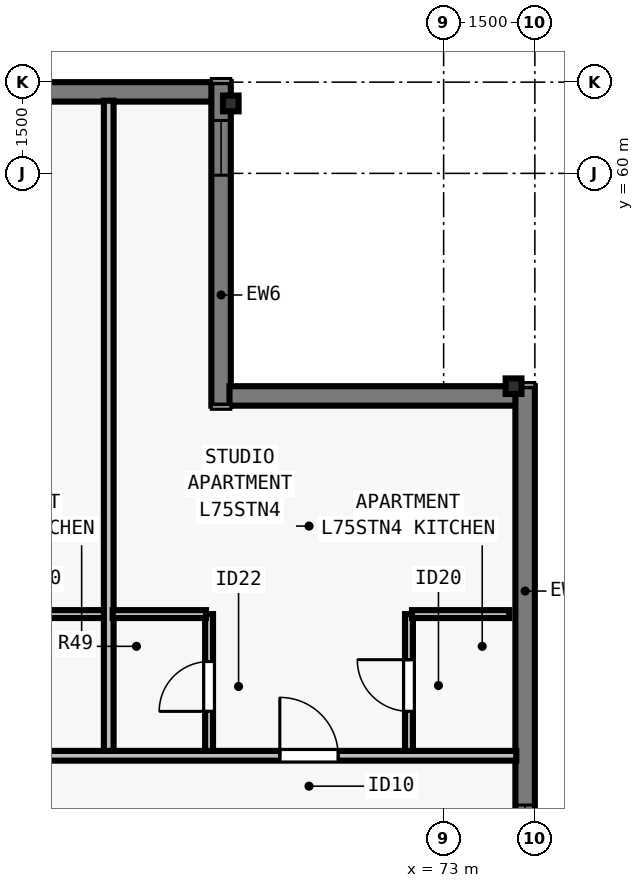
"""IFC4 building model, lengths in metres.
Left out: names, types, materials, properties, quantities, classifications, styles, units other than length and angle.
Written with IfcOpenShell. Run it as: python <this file> out.ifc"""

import sys

from ifc_helpers import new_model, si_unit, direction, frame, frame_2d, origin, origin_2d, place, context, subcontext, project, spatial, rectangle, i_section, extrude, element, fill, save


model = new_model("IFC4")
c1 = context("Model", 3, precision=1e-05, world=origin(), true_north=direction((0.0, 1.0)))
c2 = subcontext(c1, "Body", "Model", "MODEL_VIEW")
j1 = project(units=[si_unit("LENGTHUNIT", "METRE"), si_unit("PLANEANGLEUNIT", "RADIAN")], contexts=[c1])
p1 = place(None, origin())
s1 = spatial("IfcSite", under=j1, at=p1, CompositionType="ELEMENT")
p2 = place(p1, origin())
s2 = spatial("IfcBuilding", under=s1, at=p2, CompositionType="ELEMENT")
p3 = place(p2, frame((0.0, 0.0, 272.5)))
s3 = spatial("IfcBuildingStorey", under=s2, at=p3, CompositionType="ELEMENT", Elevation=272.5)
for number, where, z_axis, x_axis in (
    (1, (74.15, 56.5, 0.0), (0.0, 0.0, 1.0), (0.0, 1.0, 0.0)),
    (2, (69.5, 61.15, 0.0), (0.0, 0.0, 1.0), (1.0, 0.0, 0.0)),
):
    element("IfcColumn", number, at=place(p3, frame(where, z_axis=z_axis, x_axis=x_axis)), inside=s3, PredefinedType="COLUMN", context=c2, shape_type="SweptSolid", body=[
        extrude(i_section(OverallWidth=0.256, OverallDepth=0.26, WebThickness=0.01, FlangeThickness=0.017, FilletRadius=0.013, at=origin_2d()), origin(), (0.0, 0.0, 1.0), 3.5),
    ])
p4 = place(p3, frame((34.5, 61.34, 0.0), z_axis=(0.0, 0.0, 1.0), x_axis=(1.0, 0.0, 0.0)))
e3 = element("IfcWall", 3, at=p4, inside=s3, PredefinedType="SOLIDWALL", context=c2, shape_type="SweptSolid", body=[
    extrude(rectangle(XDim=34.702, YDim=0.32, at=frame_2d((17.351, 0.0))), origin(), (0.0, 0.0, 1.0), 3.24),
])
p5 = place(p4, frame((4.613, 0.0, 0.8)))
e4 = element("IfcOpeningElement", 4, at=p5, cuts=e3, PredefinedType="OPENING", context=c2, shape_type="SweptSolid", body=[
    extrude(rectangle(XDim=1.85, YDim=1.628, at=frame_2d((0.925, 0.814))), frame((0.0, 0.17, 0.0), z_axis=(0.0, -1.0, 0.0), x_axis=(1.0, 0.0, 0.0)), (0.0, 0.0, 1.0), 0.34),
])
p6 = place(p4, frame((8.138, 0.0, 0.8)))
e5 = element("IfcOpeningElement", 5, at=p6, cuts=e3, PredefinedType="OPENING", context=c2, shape_type="SweptSolid", body=[
    extrude(rectangle(XDim=1.55, YDim=1.628, at=frame_2d((0.775, 0.814))), frame((0.0, 0.17, 0.0), z_axis=(0.0, -1.0, 0.0), x_axis=(1.0, 0.0, 0.0)), (0.0, 0.0, 1.0), 0.34),
])
p7 = place(p4, frame((14.888, 0.0, 0.8)))
e6 = element("IfcOpeningElement", 6, at=p7, cuts=e3, PredefinedType="OPENING", context=c2, shape_type="SweptSolid", body=[
    extrude(rectangle(XDim=1.55, YDim=1.628, at=frame_2d((0.775, 0.814))), frame((0.0, 0.17, 0.0), z_axis=(0.0, -1.0, 0.0), x_axis=(1.0, 0.0, 0.0)), (0.0, 0.0, 1.0), 0.34),
])
p8 = place(p4, frame((19.364, 0.0, 0.8)))
e7 = element("IfcOpeningElement", 7, at=p8, cuts=e3, PredefinedType="OPENING", context=c2, shape_type="SweptSolid", body=[
    extrude(rectangle(XDim=1.85, YDim=1.628, at=frame_2d((0.925, 0.814))), frame((0.0, 0.17, 0.0), z_axis=(0.0, -1.0, 0.0), x_axis=(1.0, 0.0, 0.0)), (0.0, 0.0, 1.0), 0.34),
])
p9 = place(p4, frame((25.314, 0.0, 0.8)))
e8 = element("IfcOpeningElement", 8, at=p9, cuts=e3, PredefinedType="OPENING", context=c2, shape_type="SweptSolid", body=[
    extrude(rectangle(XDim=1.85, YDim=1.628, at=frame_2d((0.925, 0.814))), frame((0.0, 0.17, 0.0), z_axis=(0.0, -1.0, 0.0), x_axis=(1.0, 0.0, 0.0)), (0.0, 0.0, 1.0), 0.34),
])
p10 = place(p4, frame((28.389, 0.0, 0.8)))
e9 = element("IfcOpeningElement", 9, at=p10, cuts=e3, PredefinedType="OPENING", context=c2, shape_type="SweptSolid", body=[
    extrude(rectangle(XDim=1.55, YDim=1.628, at=frame_2d((0.775, 0.814))), frame((0.0, 0.17, 0.0), z_axis=(0.0, -1.0, 0.0), x_axis=(1.0, 0.0, 0.0)), (0.0, 0.0, 1.0), 0.34),
])
p11 = place(p3, frame((69.34, 61.5, 0.0), z_axis=(0.0, 0.0, 1.0), x_axis=(0.0, -1.0, 0.0)))
e10 = element("IfcWall", 10, at=p11, inside=s3, PredefinedType="SOLIDWALL", context=c2, shape_type="SweptSolid", body=[
    extrude(rectangle(XDim=5.32, YDim=0.32, at=frame_2d((2.66, 0.0))), origin(), (0.0, 0.0, 1.0), 3.24),
])
p12 = place(p11, frame((0.63, 0.0, 0.8)))
e11 = element("IfcOpeningElement", 11, at=p12, cuts=e10, PredefinedType="OPENING", context=c2, shape_type="SweptSolid", body=[
    extrude(rectangle(XDim=0.9, YDim=1.628, at=frame_2d((0.45, 0.814))), frame((0.0, 0.17, 0.0), z_axis=(0.0, -1.0, 0.0), x_axis=(1.0, 0.0, 0.0)), (0.0, 0.0, 1.0), 0.34),
])
p13 = place(p3, frame((69.478, 56.34, 0.0), z_axis=(0.0, 0.0, 1.0), x_axis=(1.0, 0.0, 0.0)))
e12 = element("IfcWall", 12, at=p13, inside=s3, PredefinedType="SOLIDWALL", context=c2, shape_type="SweptSolid", body=[
    extrude(rectangle(XDim=4.724, YDim=0.32, at=frame_2d((2.362, 0.0))), origin(), (0.0, 0.0, 1.0), 3.24),
])
p14 = place(p3, frame((74.34, 56.5, 0.0), z_axis=(0.0, 0.0, 1.0), x_axis=(0.0, -1.0, 0.0)))
e13 = element("IfcWall", 13, at=p14, inside=s3, PredefinedType="SOLIDWALL", context=c2, shape_type="SweptSolid", body=[
    extrude(rectangle(XDim=34.702, YDim=0.32, at=frame_2d((17.351, 0.0))), origin(), (0.0, 0.0, 1.0), 3.24),
])
p15 = place(p14, frame((6.888, 0.0, 0.8)))
e14 = element("IfcOpeningElement", 14, at=p15, cuts=e13, PredefinedType="OPENING", context=c2, shape_type="SweptSolid", body=[
    extrude(rectangle(XDim=1.55, YDim=1.628, at=frame_2d((0.775, 0.814))), frame((0.0, 0.17, 0.0), z_axis=(0.0, -1.0, 0.0), x_axis=(1.0, 0.0, 0.0)), (0.0, 0.0, 1.0), 0.34),
])
p16 = place(p14, frame((10.113, 0.0, 0.8)))
e15 = element("IfcOpeningElement", 15, at=p16, cuts=e13, PredefinedType="OPENING", context=c2, shape_type="SweptSolid", body=[
    extrude(rectangle(XDim=1.85, YDim=1.628, at=frame_2d((0.925, 0.814))), frame((0.0, 0.17, 0.0), z_axis=(0.0, -1.0, 0.0), x_axis=(1.0, 0.0, 0.0)), (0.0, 0.0, 1.0), 0.34),
])
p17 = place(p14, frame((14.038, 0.0, 0.8)))
e16 = element("IfcOpeningElement", 16, at=p17, cuts=e13, PredefinedType="OPENING", context=c2, shape_type="SweptSolid", body=[
    extrude(rectangle(XDim=1.55, YDim=1.628, at=frame_2d((0.775, 0.814))), frame((0.0, 0.17, 0.0), z_axis=(0.0, -1.0, 0.0), x_axis=(1.0, 0.0, 0.0)), (0.0, 0.0, 1.0), 0.34),
])
p18 = place(p14, frame((18.114, 0.0, 0.8)))
e17 = element("IfcOpeningElement", 17, at=p18, cuts=e13, PredefinedType="OPENING", context=c2, shape_type="SweptSolid", body=[
    extrude(rectangle(XDim=1.85, YDim=1.628, at=frame_2d((0.925, 0.814))), frame((0.0, 0.17, 0.0), z_axis=(0.0, -1.0, 0.0), x_axis=(1.0, 0.0, 0.0)), (0.0, 0.0, 1.0), 0.34),
])
p19 = place(p14, frame((23.614, 0.0, 0.8)))
e18 = element("IfcOpeningElement", 18, at=p19, cuts=e13, PredefinedType="OPENING", context=c2, shape_type="SweptSolid", body=[
    extrude(rectangle(XDim=1.85, YDim=1.628, at=frame_2d((0.925, 0.814))), frame((0.0, 0.17, 0.0), z_axis=(0.0, -1.0, 0.0), x_axis=(1.0, 0.0, 0.0)), (0.0, 0.0, 1.0), 0.34),
])
p20 = place(p14, frame((29.24, 0.0, 0.8)))
e19 = element("IfcOpeningElement", 19, at=p20, cuts=e13, PredefinedType="OPENING", context=c2, shape_type="SweptSolid", body=[
    extrude(rectangle(XDim=1.55, YDim=1.628, at=frame_2d((0.775, 0.814))), frame((0.0, 0.17, 0.0), z_axis=(0.0, -1.0, 0.0), x_axis=(1.0, 0.0, 0.0)), (0.0, 0.0, 1.0), 0.34),
])
p21 = place(p3, frame((29.805, 50.423, 0.0), z_axis=(0.0, 0.0, 1.0), x_axis=(1.0, 0.0, 0.0)))
e20 = element("IfcWall", 20, at=p21, inside=s3, PredefinedType="PARTITIONING", context=c2, shape_type="SweptSolid", body=[
    extrude(rectangle(XDim=44.39, YDim=0.16, at=frame_2d((22.195, 0.0))), origin(), (0.0, 0.0, 1.0), 2.908),
])
p22 = place(p21, frame((5.465, 0.0, 0.0)))
e21 = element("IfcOpeningElement", 21, at=p22, cuts=e20, PredefinedType="OPENING", context=c2, shape_type="SweptSolid", body=[
    extrude(rectangle(XDim=0.96, YDim=2.12, at=frame_2d((0.48, 1.06))), frame((0.0, 0.09, 0.0), z_axis=(0.0, -1.0, 0.0), x_axis=(1.0, 0.0, 0.0)), (0.0, 0.0, 1.0), 0.18),
])
p23 = place(p21, frame((19.179, 0.0, 0.0)))
e22 = element("IfcOpeningElement", 22, at=p23, cuts=e20, PredefinedType="OPENING", context=c2, shape_type="SweptSolid", body=[
    extrude(rectangle(XDim=0.96, YDim=2.18, at=frame_2d((0.48, 1.09))), frame((0.0, 0.09, 0.0), z_axis=(0.0, -1.0, 0.0), x_axis=(1.0, 0.0, 0.0)), (0.0, 0.0, 1.0), 0.18),
])
p24 = place(p21, frame((26.106, 0.0, 0.0)))
e23 = element("IfcOpeningElement", 23, at=p24, cuts=e20, PredefinedType="OPENING", context=c2, shape_type="SweptSolid", body=[
    extrude(rectangle(XDim=0.96, YDim=2.18, at=frame_2d((0.48, 1.09))), frame((0.0, 0.09, 0.0), z_axis=(0.0, -1.0, 0.0), x_axis=(1.0, 0.0, 0.0)), (0.0, 0.0, 1.0), 0.18),
])
p25 = place(p21, frame((33.214, 0.0, 0.0)))
e24 = element("IfcOpeningElement", 24, at=p25, cuts=e20, PredefinedType="OPENING", context=c2, shape_type="SweptSolid", body=[
    extrude(rectangle(XDim=0.96, YDim=2.18, at=frame_2d((0.48, 1.09))), frame((0.0, 0.09, 0.0), z_axis=(0.0, -1.0, 0.0), x_axis=(1.0, 0.0, 0.0)), (0.0, 0.0, 1.0), 0.18),
])
p26 = place(p21, frame((40.501, 0.0, 0.0)))
e25 = element("IfcOpeningElement", 25, at=p26, cuts=e20, PredefinedType="OPENING", context=c2, shape_type="SweptSolid", body=[
    extrude(rectangle(XDim=0.96, YDim=2.18, at=frame_2d((0.48, 1.09))), frame((0.0, 0.09, 0.0), z_axis=(0.0, -1.0, 0.0), x_axis=(1.0, 0.0, 0.0)), (0.0, 0.0, 1.0), 0.18),
])
p27 = place(p3, frame((65.893, 52.752, 0.0), z_axis=(0.0, 0.0, 1.0), x_axis=(1.0, 0.0, 0.0)))
e26 = element("IfcWall", 26, at=p27, inside=s3, PredefinedType="PLUMBINGWALL", context=c2, shape_type="SweptSolid", body=[
    extrude(rectangle(XDim=1.6, YDim=0.13, at=frame_2d((0.8, 0.0))), origin(), (0.0, 0.0, 1.0), 3.24),
])
p28 = place(p3, frame((67.492, 50.502, 0.0), z_axis=(0.0, 0.0, 1.0), x_axis=(0.0, 1.0, 0.0)))
e27 = element("IfcWall", 27, at=p28, inside=s3, PredefinedType="PARTITIONING", context=c2, shape_type="SweptSolid", body=[
    extrude(rectangle(XDim=10.693, YDim=0.16, at=frame_2d((5.346, 0.0))), origin(), (0.0, 0.0, 1.0), 2.523),
])
p29 = place(p3, frame((69.143, 50.502, 0.0), z_axis=(0.0, 0.0, 1.0), x_axis=(0.0, 1.0, 0.0)))
e28 = element("IfcWall", 28, at=p29, inside=s3, PredefinedType="PLUMBINGWALL", context=c2, shape_type="SweptSolid", body=[
    extrude(rectangle(XDim=2.25, YDim=0.13, at=frame_2d((1.125, 0.0))), origin(), (0.0, 0.0, 1.0), 3.24),
])
p30 = place(p29, frame((0.65, 0.0, 0.0)))
e29 = element("IfcOpeningElement", 29, at=p30, cuts=e28, PredefinedType="OPENING", context=c2, shape_type="SweptSolid", body=[
    extrude(rectangle(XDim=0.82, YDim=2.1, at=frame_2d((0.41, 1.05))), frame((0.0, 0.075, 0.0), z_axis=(0.0, -1.0, 0.0), x_axis=(1.0, 0.0, 0.0)), (0.0, 0.0, 1.0), 0.15),
])
p31 = place(p3, frame((67.558, 52.752, 0.0), z_axis=(0.0, 0.0, 1.0), x_axis=(1.0, 0.0, 0.0)))
e30 = element("IfcWall", 30, at=p31, inside=s3, PredefinedType="PLUMBINGWALL", context=c2, shape_type="SweptSolid", body=[
    extrude(rectangle(XDim=1.535, YDim=0.13, at=frame_2d((0.768, 0.0))), origin(), (0.0, 0.0, 1.0), 2.908),
])
p32 = place(p3, frame((72.43, 50.502, 0.0), z_axis=(0.0, 0.0, 1.0), x_axis=(0.0, 1.0, 0.0)))
e31 = element("IfcWall", 31, at=p32, inside=s3, PredefinedType="PLUMBINGWALL", context=c2, shape_type="SweptSolid", body=[
    extrude(rectangle(XDim=2.25, YDim=0.13, at=frame_2d((1.125, 0.0))), origin(), (0.0, 0.0, 1.0), 3.24),
])
p33 = place(p32, frame((0.65, 0.0, 0.0)))
e32 = element("IfcOpeningElement", 32, at=p33, cuts=e31, PredefinedType="OPENING", context=c2, shape_type="SweptSolid", body=[
    extrude(rectangle(XDim=0.85, YDim=2.1, at=frame_2d((0.425, 1.05))), frame((0.0, 0.075, 0.0), z_axis=(0.0, -1.0, 0.0), x_axis=(1.0, 0.0, 0.0)), (0.0, 0.0, 1.0), 0.15),
])
p34 = place(p3, frame((72.48, 52.752, 0.0), z_axis=(0.0, 0.0, 1.0), x_axis=(1.0, 0.0, 0.0)))
e33 = element("IfcWall", 33, at=p34, inside=s3, PredefinedType="PLUMBINGWALL", context=c2, shape_type="SweptSolid", body=[
    extrude(rectangle(XDim=1.6, YDim=0.13, at=frame_2d((0.8, 0.0))), origin(), (0.0, 0.0, 1.0), 3.24),
])
p35 = place(p15, origin())
e34 = element("IfcWindow", 34, at=p35, inside=s3, PartitioningType="SINGLE_PANEL", PredefinedType="WINDOW", context=c2, shape_type="SweptSolid", body=[
    extrude(rectangle(XDim=1.55, YDim=1.628, at=frame_2d((0.775, 0.814))), frame((0.0, -0.05, 0.0), z_axis=(0.0, -1.0, 0.0), x_axis=(1.0, 0.0, 0.0)), (0.0, 0.0, 1.0), 0.06),
])
fill(e14, e34)
p36 = place(p12, origin())
e35 = element("IfcWindow", 35, at=p36, inside=s3, PartitioningType="SINGLE_PANEL", PredefinedType="WINDOW", context=c2, shape_type="SweptSolid", body=[
    extrude(rectangle(XDim=0.9, YDim=1.628, at=frame_2d((0.45, 0.814))), frame((0.0, -0.04, 0.0), z_axis=(0.0, -1.0, 0.0), x_axis=(1.0, 0.0, 0.0)), (0.0, 0.0, 1.0), 0.06),
])
fill(e11, e35)
p37 = place(p30, origin())
e36 = element("IfcDoor", 36, at=p37, inside=s3, OperationType="SINGLE_SWING_LEFT", PredefinedType="DOOR", context=c2, shape_type="SweptSolid", body=[
    extrude(rectangle(XDim=0.82, YDim=2.1, at=frame_2d((0.41, 1.05))), frame((0.0, 0.025, 0.0), z_axis=(0.0, -1.0, 0.0), x_axis=(1.0, 0.0, 0.0)), (0.0, 0.0, 1.0), 0.05),
])
fill(e29, e36)
p38 = place(p33, origin())
e37 = element("IfcDoor", 37, at=p38, inside=s3, OperationType="SINGLE_SWING_RIGHT", PredefinedType="DOOR", context=c2, shape_type="SweptSolid", body=[
    extrude(rectangle(XDim=0.85, YDim=2.1, at=frame_2d((0.425, 1.05))), frame((0.0, 0.025, 0.0), z_axis=(0.0, -1.0, 0.0), x_axis=(1.0, 0.0, 0.0)), (0.0, 0.0, 1.0), 0.05),
])
fill(e32, e37)
p39 = place(p26, origin())
e38 = element("IfcDoor", 38, at=p39, inside=s3, OperationType="SINGLE_SWING_LEFT", PredefinedType="DOOR", context=c2, shape_type="SweptSolid", body=[
    extrude(rectangle(XDim=0.96, YDim=2.18, at=frame_2d((0.48, 1.09))), frame((0.0, 0.025, 0.0), z_axis=(0.0, -1.0, 0.0), x_axis=(1.0, 0.0, 0.0)), (0.0, 0.0, 1.0), 0.05),
])
fill(e25, e38)
save(model, sys.argv[1])
